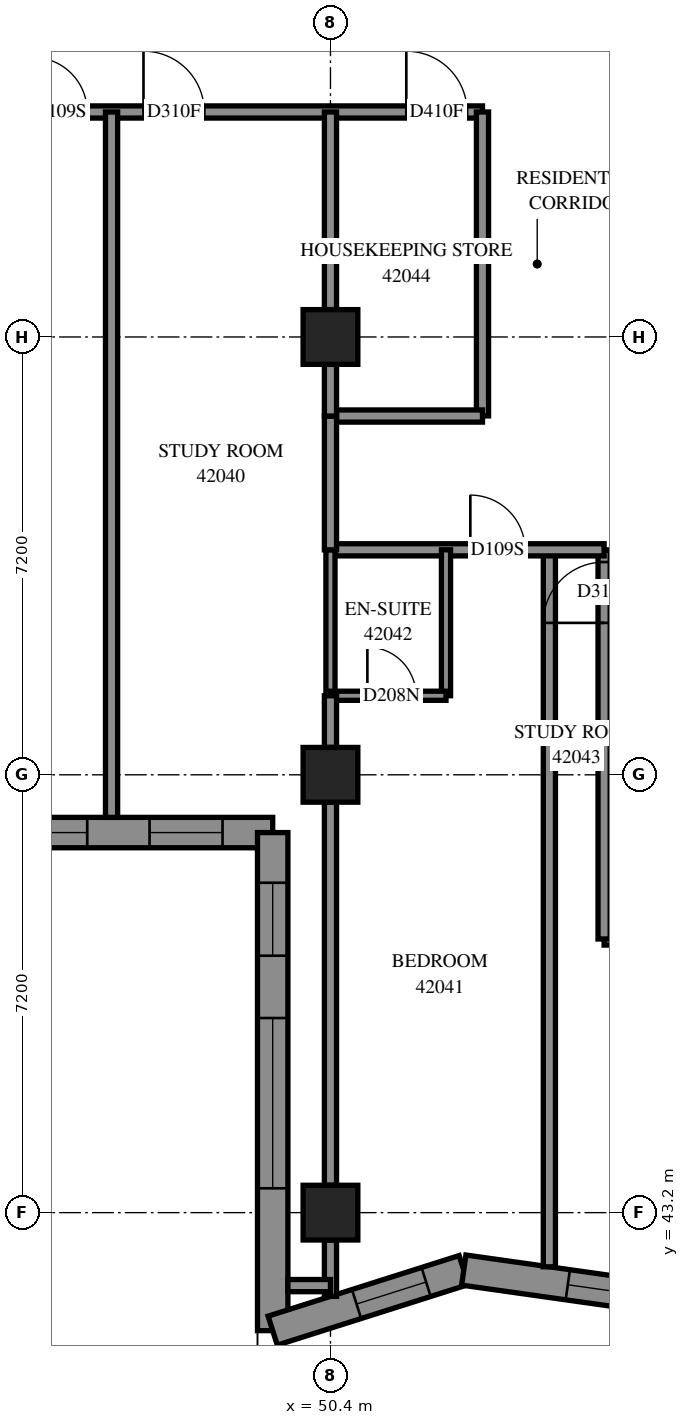
"""IFC4 building model, lengths in metres.
Left out: names, types, materials, properties, quantities, classifications, styles, units other than length and angle.
Written with IfcOpenShell. Run it as: python <this file> out.ifc"""

import sys

from ifc_helpers import new_model, si_unit, direction, frame, frame_2d, origin, origin_2d, place, context, subcontext, project, spatial, polyline, rectangle, outline, extrude, element, fill, save


model = new_model("IFC4")
c1 = context("Model", 3, precision=1e-05, world=origin(), true_north=direction((0.0, 1.0)))
c2 = subcontext(c1, "Body", "Model", "MODEL_VIEW")
j1 = project(units=[si_unit("LENGTHUNIT", "METRE"), si_unit("PLANEANGLEUNIT", "RADIAN")], contexts=[c1])
p1 = place(None, origin())
s1 = spatial("IfcSite", under=j1, at=p1, CompositionType="ELEMENT")
p2 = place(p1, origin())
s2 = spatial("IfcBuilding", under=s1, at=p2, CompositionType="ELEMENT")
p3 = place(p2, frame((0.0, 0.0, 155.8)))
s3 = spatial("IfcBuildingStorey", under=s2, at=p3, CompositionType="ELEMENT", Elevation=155.8)
for number, where, z_axis, x_axis in (
    (1, (50.4, 43.2, 0.0), (0.0, 0.0, 1.0), (1.0, 0.0, 0.0)),
    (2, (50.4, 50.4, 0.0), (0.0, 0.0, 1.0), (1.0, 0.0, 0.0)),
    (3, (50.4, 57.6, 0.0), (0.0, 0.0, 1.0), (1.0, 0.0, 0.0)),
):
    element("IfcColumn", number, at=place(p3, frame(where, z_axis=z_axis, x_axis=x_axis)), inside=s3, PredefinedType="COLUMN", context=c2, shape_type="SweptSolid", body=[
        extrude(rectangle(XDim=0.9, YDim=0.9, at=origin_2d()), origin(), (0.0, 0.0, 1.0), 3.1),
    ])
p4 = place(p3, frame((42.25, 49.45, 0.0), z_axis=(0.0, 0.0, 1.0), x_axis=(1.0, 0.0, 0.0)))
e4 = element("IfcWall", 4, at=p4, inside=s3, PredefinedType="SOLIDWALL", context=c2, shape_type="SweptSolid", body=[
    extrude(outline(polyline([(-0.25, -0.25), (6.95, -0.25), (7.45, 0.25), (0.25, 0.25), (-0.25, -0.25)])), origin(), (0.0, 0.0, 1.0), 3.1),
])
p5 = place(p4, frame((1.35, 0.0, 0.45)))
e5 = element("IfcOpeningElement", 5, at=p5, cuts=e4, PredefinedType="OPENING", context=c2, shape_type="SweptSolid", body=[
    extrude(rectangle(XDim=2.8, YDim=2.5, at=frame_2d((1.4, 1.25))), frame((0.0, 0.26, 0.0), z_axis=(0.0, -1.0, 0.0), x_axis=(1.0, 0.0, 0.0)), (0.0, 0.0, 1.0), 0.52),
])
p6 = place(p4, frame((5.175, 0.0, 0.45)))
e6 = element("IfcOpeningElement", 6, at=p6, cuts=e4, PredefinedType="OPENING", context=c2, shape_type="SweptSolid", body=[
    extrude(rectangle(XDim=1.2, YDim=2.5, at=frame_2d((0.6, 1.25))), frame((0.0, 0.26, 0.0), z_axis=(0.0, -1.0, 0.0), x_axis=(1.0, 0.0, 0.0)), (0.0, 0.0, 1.0), 0.52),
])
p7 = place(p3, frame((49.45, 49.45, 0.0), z_axis=(0.0, 0.0, 1.0), x_axis=(0.0, -1.0, 0.0)))
e7 = element("IfcWall", 7, at=p7, inside=s3, PredefinedType="SOLIDWALL", context=c2, shape_type="SweptSolid", body=[
    extrude(outline(polyline([(0.25, -0.25), (8.532, -0.25), (7.849, 0.25), (-0.25, 0.25), (0.25, -0.25)])), origin(), (0.0, 0.0, 1.0), 3.1),
])
p8 = place(p7, frame((3.05, 0.0, 0.45)))
e8 = element("IfcOpeningElement", 8, at=p8, cuts=e7, PredefinedType="OPENING", context=c2, shape_type="SweptSolid", body=[
    extrude(rectangle(XDim=2.8, YDim=2.5, at=frame_2d((1.4, 1.25))), frame((0.0, 0.26, 0.0), z_axis=(0.0, -1.0, 0.0), x_axis=(1.0, 0.0, 0.0)), (0.0, 0.0, 1.0), 0.52),
])
p9 = place(p7, frame((0.825, 0.0, 0.45)))
e9 = element("IfcOpeningElement", 9, at=p9, cuts=e7, PredefinedType="OPENING", context=c2, shape_type="SweptSolid", body=[
    extrude(rectangle(XDim=1.2, YDim=2.5, at=frame_2d((0.6, 1.25))), frame((0.0, 0.26, 0.0), z_axis=(0.0, -1.0, 0.0), x_axis=(1.0, 0.0, 0.0)), (0.0, 0.0, 1.0), 0.52),
])
p10 = place(p3, frame((49.45, 41.26, 0.0), z_axis=(0.0, 0.0, 1.0), x_axis=(0.9532547248, 0.3021678832, 0.0)))
e10 = element("IfcWall", 10, at=p10, inside=s3, PredefinedType="SOLIDWALL", context=c2, shape_type="SweptSolid", body=[
    extrude(outline(polyline([(-0.342, -0.25), (3.239, -0.25), (3.353, 0.25), (0.342, 0.25), (-0.342, -0.25)])), origin(), (0.0, 0.0, 1.0), 3.1),
])
p11 = place(p10, frame((1.446, 0.0, 0.45)))
e11 = element("IfcOpeningElement", 11, at=p11, cuts=e10, PredefinedType="OPENING", context=c2, shape_type="SweptSolid", body=[
    extrude(rectangle(XDim=1.2, YDim=2.5, at=frame_2d((0.6, 1.25))), frame((0.0, 0.26, 0.0), z_axis=(0.0, -1.0, 0.0), x_axis=(1.0, 0.0, 0.0)), (0.0, 0.0, 1.0), 0.52),
])
p12 = place(p3, frame((52.592, 42.255, 0.0), z_axis=(0.0, 0.0, 1.0), x_axis=(0.9901776599, -0.1398148844, 0.0)))
e12 = element("IfcWall", 12, at=p12, inside=s3, PredefinedType="SOLIDWALL", context=c2, shape_type="SweptSolid", body=[
    extrude(outline(polyline([(0.057, -0.25), (3.504, -0.25), (3.434, 0.25), (-0.057, 0.25), (0.057, -0.25)])), origin(), (0.0, 0.0, 1.0), 3.1),
])
p13 = place(p12, frame((1.728, 0.0, 0.45)))
e13 = element("IfcOpeningElement", 13, at=p13, cuts=e12, PredefinedType="OPENING", context=c2, shape_type="SweptSolid", body=[
    extrude(rectangle(XDim=1.2, YDim=2.5, at=frame_2d((0.6, 1.25))), frame((0.0, 0.26, 0.0), z_axis=(0.0, -1.0, 0.0), x_axis=(1.0, 0.0, 0.0)), (0.0, 0.0, 1.0), 0.52),
])
p14 = place(p3, frame((54.9, 47.7, 0.0), z_axis=(0.0, 0.0, 1.0), x_axis=(1.0, 0.0, 0.0)))
e14 = element("IfcWall", 14, at=p14, inside=s3, PredefinedType="PARTITIONING", context=c2, shape_type="SweptSolid", body=[
    extrude(rectangle(XDim=19.326, YDim=0.2, at=frame_2d((9.663, 0.0))), origin(), (0.0, 0.0, 1.0), 3.1),
])
p15 = place(p14, frame((6.643, 0.0, 0.0)))
e15 = element("IfcOpeningElement", 15, at=p15, cuts=e14, PredefinedType="OPENING", context=c2, shape_type="SweptSolid", body=[
    extrude(rectangle(XDim=0.9, YDim=2.1, at=frame_2d((0.45, 1.05))), frame((0.0, 0.11, 0.0), z_axis=(0.0, -1.0, 0.0), x_axis=(1.0, 0.0, 0.0)), (0.0, 0.0, 1.0), 0.22),
])
p16 = place(p14, frame((13.843, 0.0, 0.0)))
e16 = element("IfcOpeningElement", 16, at=p16, cuts=e14, PredefinedType="OPENING", context=c2, shape_type="SweptSolid", body=[
    extrude(rectangle(XDim=0.9, YDim=2.1, at=frame_2d((0.45, 1.05))), frame((0.0, 0.11, 0.0), z_axis=(0.0, -1.0, 0.0), x_axis=(1.0, 0.0, 0.0)), (0.0, 0.0, 1.0), 0.22),
])
p17 = place(p3, frame((36.0, 61.3, 0.0), z_axis=(0.0, 0.0, 1.0), x_axis=(1.0, 0.0, 0.0)))
e17 = element("IfcWall", 17, at=p17, inside=s3, PredefinedType="PARTITIONING", context=c2, shape_type="SweptSolid", body=[
    extrude(rectangle(XDim=16.9, YDim=0.2, at=frame_2d((8.45, 0.0))), origin(), (0.0, 0.0, 1.0), 3.1),
])
p18 = place(p17, frame((2.3, 0.0, 0.0)))
e18 = element("IfcOpeningElement", 18, at=p18, cuts=e17, PredefinedType="OPENING", context=c2, shape_type="SweptSolid", body=[
    extrude(rectangle(XDim=0.9, YDim=2.1, at=frame_2d((0.45, 1.05))), frame((0.0, 0.11, 0.0), z_axis=(0.0, -1.0, 0.0), x_axis=(1.0, 0.0, 0.0)), (0.0, 0.0, 1.0), 0.22),
])
p19 = place(p17, frame((4.125, 0.0, 0.0)))
e19 = element("IfcOpeningElement", 19, at=p19, cuts=e17, PredefinedType="OPENING", context=c2, shape_type="SweptSolid", body=[
    extrude(rectangle(XDim=1.0, YDim=2.1, at=frame_2d((0.5, 1.05))), frame((0.0, 0.11, 0.0), z_axis=(0.0, -1.0, 0.0), x_axis=(1.0, 0.0, 0.0)), (0.0, 0.0, 1.0), 0.22),
])
p20 = place(p17, frame((9.5, 0.0, 0.0)))
e20 = element("IfcOpeningElement", 20, at=p20, cuts=e17, PredefinedType="OPENING", context=c2, shape_type="SweptSolid", body=[
    extrude(rectangle(XDim=0.9, YDim=2.1, at=frame_2d((0.45, 1.05))), frame((0.0, 0.11, 0.0), z_axis=(0.0, -1.0, 0.0), x_axis=(1.0, 0.0, 0.0)), (0.0, 0.0, 1.0), 0.22),
])
p21 = place(p17, frame((11.325, 0.0, 0.0)))
e21 = element("IfcOpeningElement", 21, at=p21, cuts=e17, PredefinedType="OPENING", context=c2, shape_type="SweptSolid", body=[
    extrude(rectangle(XDim=1.0, YDim=2.1, at=frame_2d((0.5, 1.05))), frame((0.0, 0.11, 0.0), z_axis=(0.0, -1.0, 0.0), x_axis=(1.0, 0.0, 0.0)), (0.0, 0.0, 1.0), 0.22),
])
p22 = place(p17, frame((15.647, 0.0, 0.0)))
e22 = element("IfcOpeningElement", 22, at=p22, cuts=e17, PredefinedType="OPENING", context=c2, shape_type="SweptSolid", body=[
    extrude(rectangle(XDim=1.0, YDim=2.1, at=frame_2d((0.5, 1.05))), frame((0.0, 0.11, 0.0), z_axis=(0.0, -1.0, 0.0), x_axis=(1.0, 0.0, 0.0)), (0.0, 0.0, 1.0), 0.22),
])
p23 = place(p3, frame((54.0, 42.309, 0.0), z_axis=(0.0, 0.0, 1.0), x_axis=(0.0, 1.0, 0.0)))
e23 = element("IfcWall", 23, at=p23, inside=s3, PredefinedType="PARTITIONING", context=c2, shape_type="SweptSolid", body=[
    extrude(rectangle(XDim=11.791, YDim=0.2, at=frame_2d((5.895, 0.0))), origin(), (0.0, 0.0, 1.0), 3.1),
])
p24 = place(p3, frame((46.8, 49.7, 0.0), z_axis=(0.0, 0.0, 1.0), x_axis=(0.0, 1.0, 0.0)))
e24 = element("IfcWall", 24, at=p24, inside=s3, PredefinedType="PARTITIONING", context=c2, shape_type="SweptSolid", body=[
    extrude(rectangle(XDim=11.6, YDim=0.2, at=frame_2d((5.8, 0.0))), origin(), (0.0, 0.0, 1.0), 3.1),
])
p25 = place(p3, frame((54.9, 47.7, 0.0), z_axis=(0.0, 0.0, 1.0), x_axis=(0.0, 1.0, 0.0)))
e25 = element("IfcWall", 25, at=p25, inside=s3, PredefinedType="PARTITIONING", context=c2, shape_type="SweptSolid", body=[
    extrude(rectangle(XDim=6.4, YDim=0.2, at=frame_2d((3.2, 0.0))), origin(), (0.0, 0.0, 1.0), 3.1),
])
p26 = place(p25, frame((5.199, 0.0, 0.0)))
e26 = element("IfcOpeningElement", 26, at=p26, cuts=e25, PredefinedType="OPENING", context=c2, shape_type="SweptSolid", body=[
    extrude(rectangle(XDim=1.0, YDim=2.1, at=frame_2d((0.5, 1.05))), frame((0.0, 0.11, 0.0), z_axis=(0.0, -1.0, 0.0), x_axis=(1.0, 0.0, 0.0)), (0.0, 0.0, 1.0), 0.22),
])
p27 = place(p3, frame((50.4, 43.65, 0.0), z_axis=(0.0, 0.0, 1.0), x_axis=(0.0, 1.0, 0.0)))
e27 = element("IfcWall", 27, at=p27, inside=s3, PredefinedType="PARTITIONING", context=c2, shape_type="SweptSolid", body=[
    extrude(rectangle(XDim=6.3, YDim=0.2, at=frame_2d((3.15, 0.0))), origin(), (0.0, 0.0, 1.0), 2.6),
])
p28 = place(p3, frame((52.9, 56.302, 0.0), z_axis=(0.0, 0.0, 1.0), x_axis=(0.0, 1.0, 0.0)))
e28 = element("IfcWall", 28, at=p28, inside=s3, PredefinedType="PARTITIONING", context=c2, shape_type="SweptSolid", body=[
    extrude(rectangle(XDim=4.998, YDim=0.2, at=frame_2d((2.499, 0.0))), origin(), (0.0, 0.0, 1.0), 3.1),
])
p29 = place(p3, frame((50.4, 54.1, 0.0), z_axis=(0.0, 0.0, 1.0), x_axis=(1.0, 0.0, 0.0)))
e29 = element("IfcWall", 29, at=p29, inside=s3, PredefinedType="PARTITIONING", context=c2, shape_type="SweptSolid", body=[
    extrude(rectangle(XDim=4.5, YDim=0.2, at=frame_2d((2.25, 0.0))), origin(), (0.0, 0.0, 1.0), 3.1),
])
p30 = place(p29, frame((2.3, 0.0, 0.0)))
e30 = element("IfcOpeningElement", 30, at=p30, cuts=e29, PredefinedType="OPENING", context=c2, shape_type="SweptSolid", body=[
    extrude(rectangle(XDim=0.9, YDim=2.1, at=frame_2d((0.45, 1.05))), frame((0.0, 0.11, 0.0), z_axis=(0.0, -1.0, 0.0), x_axis=(1.0, 0.0, 0.0)), (0.0, 0.0, 1.0), 0.22),
])
p31 = place(p3, frame((50.4, 58.05, 0.0), z_axis=(0.0, 0.0, 1.0), x_axis=(0.0, 1.0, 0.0)))
e31 = element("IfcWall", 31, at=p31, inside=s3, PredefinedType="PARTITIONING", context=c2, shape_type="SweptSolid", body=[
    extrude(rectangle(XDim=3.25, YDim=0.2, at=frame_2d((1.625, 0.0))), origin(), (0.0, 0.0, 1.0), 3.1),
])
p32 = place(p3, frame((50.4, 56.3, 0.0), z_axis=(0.0, 0.0, 1.0), x_axis=(1.0, 0.0, 0.0)))
e32 = element("IfcWall", 32, at=p32, inside=s3, PredefinedType="PARTITIONING", context=c2, shape_type="SweptSolid", body=[
    extrude(rectangle(XDim=2.5, YDim=0.2, at=frame_2d((1.25, 0.0))), origin(), (0.0, 0.0, 1.0), 3.1),
])
for number, where, z_axis, x_axis in (
    (33, (52.3, 51.7, 0.0), (0.0, 0.0, 1.0), (0.0, 1.0, 0.0)),
    (34, (50.4, 51.7, 0.0), (0.0, 0.0, 1.0), (0.0, 1.0, 0.0)),
):
    element("IfcWall", number, at=place(p3, frame(where, z_axis=z_axis, x_axis=x_axis)), inside=s3, PredefinedType="PARTITIONING", context=c2, shape_type="SweptSolid", body=[
        extrude(rectangle(XDim=2.4, YDim=0.15, at=frame_2d((1.2, 0.0))), origin(), (0.0, 0.0, 1.0), 3.1),
    ])
p33 = place(p3, frame((50.4, 54.1, 0.0), z_axis=(0.0, 0.0, 1.0), x_axis=(0.0, 1.0, 0.0)))
e35 = element("IfcWall", 35, at=p33, inside=s3, PredefinedType="PARTITIONING", context=c2, shape_type="SweptSolid", body=[
    extrude(rectangle(XDim=2.2, YDim=0.2, at=frame_2d((1.1, 0.0))), origin(), (0.0, 0.0, 1.0), 3.1),
])
p34 = place(p3, frame((50.4, 51.7, 0.0), z_axis=(0.0, 0.0, 1.0), x_axis=(1.0, 0.0, 0.0)))
e36 = element("IfcWall", 36, at=p34, inside=s3, PredefinedType="PARTITIONING", context=c2, shape_type="SweptSolid", body=[
    extrude(rectangle(XDim=1.9, YDim=0.15, at=frame_2d((0.95, 0.0))), origin(), (0.0, 0.0, 1.0), 3.1),
])
p35 = place(p34, frame((0.607, 0.0, 0.0)))
e37 = element("IfcOpeningElement", 37, at=p35, cuts=e36, PredefinedType="OPENING", context=c2, shape_type="SweptSolid", body=[
    extrude(rectangle(XDim=0.8, YDim=2.1, at=frame_2d((0.4, 1.05))), frame((0.0, 0.085, 0.0), z_axis=(0.0, -1.0, 0.0), x_axis=(1.0, 0.0, 0.0)), (0.0, 0.0, 1.0), 0.17),
])
for number, where, z_axis, x_axis in (
    (38, (50.4, 50.85, 0.0), (0.0, 0.0, 1.0), (0.0, 1.0, 0.0)),
    (39, (50.4, 56.3, 0.0), (0.0, 0.0, 1.0), (0.0, 1.0, 0.0)),
):
    element("IfcWall", number, at=place(p3, frame(where, z_axis=z_axis, x_axis=x_axis)), inside=s3, PredefinedType="PARTITIONING", context=c2, shape_type="SweptSolid", body=[
        extrude(rectangle(XDim=0.85, YDim=0.2, at=frame_2d((0.425, 0.0))), origin(), (0.0, 0.0, 1.0), 3.1),
    ])
p36 = place(p3, frame((50.4, 41.823, 0.0), z_axis=(0.0, 0.0, 1.0), x_axis=(0.0, 1.0, 0.0)))
e40 = element("IfcWall", 40, at=p36, inside=s3, PredefinedType="PARTITIONING", context=c2, shape_type="SweptSolid", body=[
    extrude(rectangle(XDim=0.927, YDim=0.2, at=frame_2d((0.464, 0.0))), origin(), (0.0, 0.0, 1.0), 3.1),
])
p37 = place(p3, frame((49.7, 42.0, 0.0), z_axis=(0.0, 0.0, 1.0), x_axis=(1.0, 0.0, 0.0)))
e41 = element("IfcWall", 41, at=p37, inside=s3, PredefinedType="PARTITIONING", context=c2, shape_type="SweptSolid", body=[
    extrude(rectangle(XDim=0.7, YDim=0.2, at=frame_2d((0.35, 0.0))), origin(), (0.0, 0.0, 1.0), 3.1),
])
p38 = place(p5, origin())
e42 = element("IfcWindow", 42, at=p38, inside=s3, PartitioningType="SINGLE_PANEL", PredefinedType="WINDOW", context=c2, shape_type="SweptSolid", body=[
    extrude(rectangle(XDim=2.8, YDim=2.5, at=frame_2d((1.4, 1.25))), frame((0.0, 0.18, 0.0), z_axis=(0.0, -1.0, 0.0), x_axis=(1.0, 0.0, 0.0)), (0.0, 0.0, 1.0), 0.06),
])
fill(e5, e42)
p39 = place(p6, origin())
e43 = element("IfcWindow", 43, at=p39, inside=s3, PartitioningType="SINGLE_PANEL", PredefinedType="WINDOW", context=c2, shape_type="SweptSolid", body=[
    extrude(rectangle(XDim=1.2, YDim=2.5, at=frame_2d((0.6, 1.25))), frame((0.0, 0.18, 0.0), z_axis=(0.0, -1.0, 0.0), x_axis=(1.0, 0.0, 0.0)), (0.0, 0.0, 1.0), 0.06),
])
fill(e6, e43)
p40 = place(p8, origin())
e44 = element("IfcWindow", 44, at=p40, inside=s3, PartitioningType="SINGLE_PANEL", PredefinedType="WINDOW", context=c2, shape_type="SweptSolid", body=[
    extrude(rectangle(XDim=2.8, YDim=2.5, at=frame_2d((1.4, 1.25))), frame((0.0, 0.18, 0.0), z_axis=(0.0, -1.0, 0.0), x_axis=(1.0, 0.0, 0.0)), (0.0, 0.0, 1.0), 0.06),
])
fill(e8, e44)
p41 = place(p9, origin())
e45 = element("IfcWindow", 45, at=p41, inside=s3, PartitioningType="SINGLE_PANEL", PredefinedType="WINDOW", context=c2, shape_type="SweptSolid", body=[
    extrude(rectangle(XDim=1.2, YDim=2.5, at=frame_2d((0.6, 1.25))), frame((0.0, 0.18, 0.0), z_axis=(0.0, -1.0, 0.0), x_axis=(1.0, 0.0, 0.0)), (0.0, 0.0, 1.0), 0.06),
])
fill(e9, e45)
p42 = place(p11, origin())
e46 = element("IfcWindow", 46, at=p42, inside=s3, PartitioningType="SINGLE_PANEL", PredefinedType="WINDOW", context=c2, shape_type="SweptSolid", body=[
    extrude(rectangle(XDim=1.2, YDim=2.5, at=frame_2d((0.6, 1.25))), frame((0.0, 0.18, 0.0), z_axis=(0.0, -1.0, 0.0), x_axis=(1.0, 0.0, 0.0)), (0.0, 0.0, 1.0), 0.06),
])
fill(e11, e46)
p43 = place(p13, origin())
e47 = element("IfcWindow", 47, at=p43, inside=s3, PartitioningType="SINGLE_PANEL", PredefinedType="WINDOW", context=c2, shape_type="SweptSolid", body=[
    extrude(rectangle(XDim=1.2, YDim=2.5, at=frame_2d((0.6, 1.25))), frame((0.0, 0.18, 0.0), z_axis=(0.0, -1.0, 0.0), x_axis=(1.0, 0.0, 0.0)), (0.0, 0.0, 1.0), 0.06),
])
fill(e13, e47)
p44 = place(p20, origin())
e48 = element("IfcDoor", 48, at=p44, inside=s3, OperationType="SINGLE_SWING_LEFT", PredefinedType="DOOR", context=c2, shape_type="SweptSolid", body=[
    extrude(rectangle(XDim=0.9, YDim=2.1, at=frame_2d((0.45, 1.05))), frame((0.0, 0.025, 0.0), z_axis=(0.0, -1.0, 0.0), x_axis=(1.0, 0.0, 0.0)), (0.0, 0.0, 1.0), 0.05),
])
fill(e20, e48)
p45 = place(p21, origin())
e49 = element("IfcDoor", 49, at=p45, inside=s3, OperationType="SINGLE_SWING_RIGHT", PredefinedType="DOOR", context=c2, shape_type="SweptSolid", body=[
    extrude(rectangle(XDim=1.0, YDim=2.1, at=frame_2d((0.5, 1.05))), frame((0.0, 0.025, 0.0), z_axis=(0.0, -1.0, 0.0), x_axis=(1.0, 0.0, 0.0)), (0.0, 0.0, 1.0), 0.05),
])
fill(e21, e49)
p46 = place(p30, origin())
e50 = element("IfcDoor", 50, at=p46, inside=s3, OperationType="SINGLE_SWING_LEFT", PredefinedType="DOOR", context=c2, shape_type="SweptSolid", body=[
    extrude(rectangle(XDim=0.9, YDim=2.1, at=frame_2d((0.45, 1.05))), frame((0.0, 0.025, 0.0), z_axis=(0.0, -1.0, 0.0), x_axis=(1.0, 0.0, 0.0)), (0.0, 0.0, 1.0), 0.05),
])
fill(e30, e50)
p47 = place(p35, origin())
e51 = element("IfcDoor", 51, at=p47, inside=s3, OperationType="SINGLE_SWING_RIGHT", PredefinedType="DOOR", context=c2, shape_type="SweptSolid", body=[
    extrude(rectangle(XDim=0.8, YDim=2.1, at=frame_2d((0.4, 1.05))), frame((0.0, 0.025, 0.0), z_axis=(0.0, -1.0, 0.0), x_axis=(1.0, 0.0, 0.0)), (0.0, 0.0, 1.0), 0.05),
])
fill(e37, e51)
p48 = place(p26, origin())
e52 = element("IfcDoor", 52, at=p48, inside=s3, OperationType="SINGLE_SWING_RIGHT", PredefinedType="DOOR", context=c2, shape_type="SweptSolid", body=[
    extrude(rectangle(XDim=1.0, YDim=2.1, at=frame_2d((0.5, 1.05))), frame((0.0, 0.025, 0.0), z_axis=(0.0, -1.0, 0.0), x_axis=(1.0, 0.0, 0.0)), (0.0, 0.0, 1.0), 0.05),
])
fill(e26, e52)
p49 = place(p22, origin())
e53 = element("IfcDoor", 53, at=p49, inside=s3, OperationType="SINGLE_SWING_LEFT", PredefinedType="DOOR", context=c2, shape_type="SweptSolid", body=[
    extrude(rectangle(XDim=1.0, YDim=2.1, at=frame_2d((0.5, 1.05))), frame((0.0, 0.025, 0.0), z_axis=(0.0, -1.0, 0.0), x_axis=(1.0, 0.0, 0.0)), (0.0, 0.0, 1.0), 0.05),
])
fill(e22, e53)
save(model, sys.argv[1])
